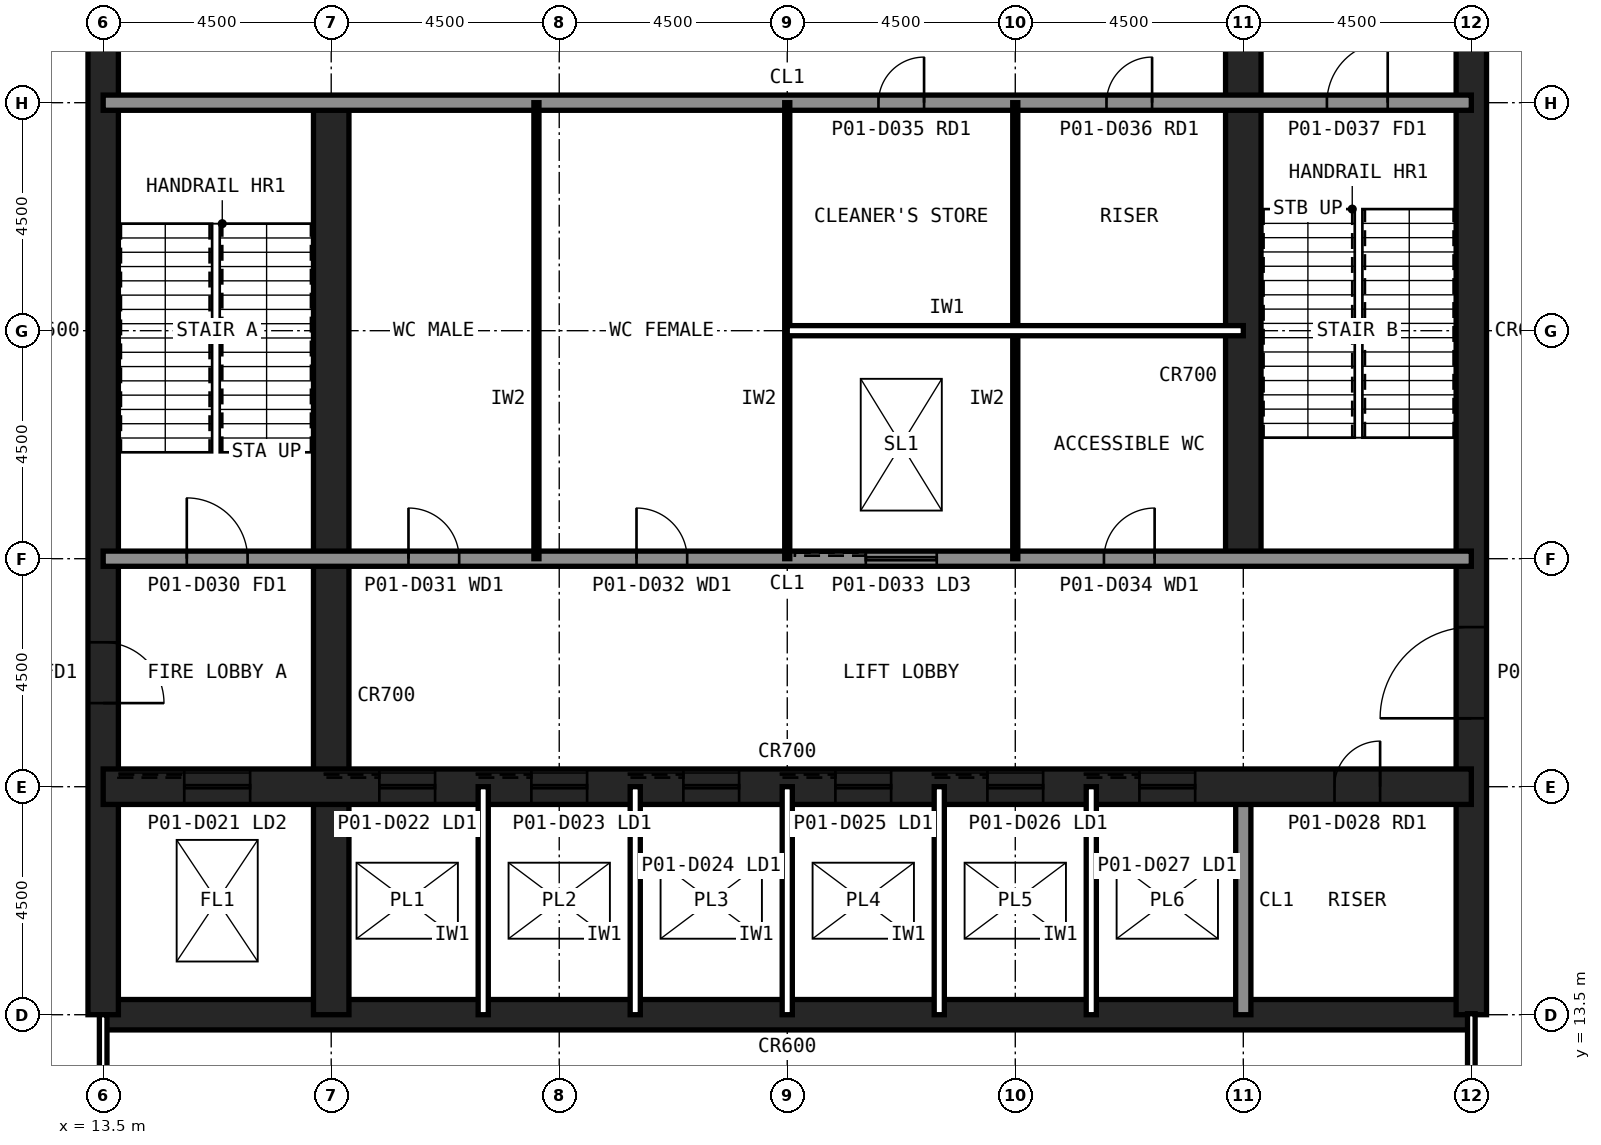
"""IFC4 building model, lengths in metres.
Left out: names, types, materials, properties, quantities, classifications, styles, units other than length and angle.
Written with IfcOpenShell. Run it as: python <this file> out.ifc"""

import sys

from ifc_helpers import new_model, si_unit, direction, frame, frame_2d, origin, place, context, subcontext, project, spatial, rectangle, extrude, element, fill, save


model = new_model("IFC4")
c1 = context("Model", 3, precision=1e-05, world=origin(), true_north=direction((0.0, 1.0)))
c2 = subcontext(c1, "Body", "Model", "MODEL_VIEW")
j1 = project(units=[si_unit("LENGTHUNIT", "METRE"), si_unit("PLANEANGLEUNIT", "RADIAN")], contexts=[c1])
p1 = place(None, origin())
s1 = spatial("IfcSite", under=j1, at=p1, CompositionType="ELEMENT")
p2 = place(p1, origin())
s2 = spatial("IfcBuilding", under=s1, at=p2, CompositionType="ELEMENT")
p3 = place(p2, origin())
s3 = spatial("IfcBuildingStorey", under=s2, at=p3, CompositionType="ELEMENT", Elevation=0.0)
p4 = place(p3, frame((13.5, 13.5, -0.25), z_axis=(0.0, 0.0, 1.0), x_axis=(1.0, 0.0, 0.0)))
e1 = element("IfcWall", 1, at=p4, inside=s3, PredefinedType="SHEAR", context=c2, shape_type="SweptSolid", body=[
    extrude(rectangle(XDim=27.0, YDim=0.6, at=frame_2d((13.5, 0.0))), origin(), (0.0, 0.0, 1.0), 6.25),
])
p5 = place(p3, frame((40.5, 13.5, -0.25), z_axis=(0.0, 0.0, 1.0), x_axis=(0.0, 1.0, 0.0)))
e2 = element("IfcWall", 2, at=p5, inside=s3, PredefinedType="SHEAR", context=c2, shape_type="SweptSolid", body=[
    extrude(rectangle(XDim=27.0, YDim=0.6, at=frame_2d((13.5, 0.0))), origin(), (0.0, 0.0, 1.0), 6.25),
])
p6 = place(p5, frame((5.85, 0.0, 0.25)))
e3 = element("IfcOpeningElement", 3, at=p6, cuts=e2, PredefinedType="OPENING", context=c2, shape_type="SweptSolid", body=[
    extrude(rectangle(XDim=1.8, YDim=2.1, at=frame_2d((0.9, 1.05))), frame((0.0, 0.31, 0.0), z_axis=(0.0, -1.0, 0.0), x_axis=(1.0, 0.0, 0.0)), (0.0, 0.0, 1.0), 0.62),
])
p7 = place(p5, frame((19.65, 0.0, 0.25)))
e4 = element("IfcOpeningElement", 4, at=p7, cuts=e2, PredefinedType="OPENING", context=c2, shape_type="SweptSolid", body=[
    extrude(rectangle(XDim=1.2, YDim=2.1, at=frame_2d((0.6, 1.05))), frame((0.0, 0.31, 0.0), z_axis=(0.0, -1.0, 0.0), x_axis=(1.0, 0.0, 0.0)), (0.0, 0.0, 1.0), 0.62),
])
p8 = place(p3, frame((13.5, 40.5, -0.25), z_axis=(0.0, 0.0, 1.0), x_axis=(0.0, -1.0, 0.0)))
e5 = element("IfcWall", 5, at=p8, inside=s3, PredefinedType="SHEAR", context=c2, shape_type="SweptSolid", body=[
    extrude(rectangle(XDim=27.0, YDim=0.6, at=frame_2d((13.5, 0.0))), origin(), (0.0, 0.0, 1.0), 6.25),
])
p9 = place(p8, frame((19.65, 0.0, 0.25)))
e6 = element("IfcOpeningElement", 6, at=p9, cuts=e5, PredefinedType="OPENING", context=c2, shape_type="SweptSolid", body=[
    extrude(rectangle(XDim=1.2, YDim=2.1, at=frame_2d((0.6, 1.05))), frame((0.0, 0.31, 0.0), z_axis=(0.0, -1.0, 0.0), x_axis=(1.0, 0.0, 0.0)), (0.0, 0.0, 1.0), 0.62),
])
p10 = place(p8, frame((5.85, 0.0, 0.25)))
e7 = element("IfcOpeningElement", 7, at=p10, cuts=e5, PredefinedType="OPENING", context=c2, shape_type="SweptSolid", body=[
    extrude(rectangle(XDim=1.8, YDim=2.1, at=frame_2d((0.9, 1.05))), frame((0.0, 0.31, 0.0), z_axis=(0.0, -1.0, 0.0), x_axis=(1.0, 0.0, 0.0)), (0.0, 0.0, 1.0), 0.62),
])
p11 = place(p3, frame((18.0, 13.5, -0.25), z_axis=(0.0, 0.0, 1.0), x_axis=(0.0, 1.0, 0.0)))
e8 = element("IfcWall", 8, at=p11, inside=s3, PredefinedType="SHEAR", context=c2, shape_type="SweptSolid", body=[
    extrude(rectangle(XDim=18.0, YDim=0.7, at=frame_2d((9.0, 0.0))), origin(), (0.0, 0.0, 1.0), 6.25),
])
p12 = place(p3, frame((36.0, 13.5, -0.25), z_axis=(0.0, 0.0, 1.0), x_axis=(0.0, 1.0, 0.0)))
e9 = element("IfcWall", 9, at=p12, inside=s3, PredefinedType="SOLIDWALL", context=c2, shape_type="SweptSolid", body=[
    extrude(rectangle(XDim=4.5, YDim=0.3, at=frame_2d((2.25, 0.0))), origin(), (0.0, 0.0, 1.0), 6.05),
])
p13 = place(p3, frame((36.0, 22.5, -0.25), z_axis=(0.0, 0.0, 1.0), x_axis=(0.0, 1.0, 0.0)))
e10 = element("IfcWall", 10, at=p13, inside=s3, PredefinedType="SHEAR", context=c2, shape_type="SweptSolid", body=[
    extrude(rectangle(XDim=18.0, YDim=0.7, at=frame_2d((9.0, 0.0))), origin(), (0.0, 0.0, 1.0), 6.25),
])
p14 = place(p3, frame((13.5, 18.0, -0.25), z_axis=(0.0, 0.0, 1.0), x_axis=(1.0, 0.0, 0.0)))
e11 = element("IfcWall", 11, at=p14, inside=s3, PredefinedType="SHEAR", context=c2, shape_type="SweptSolid", body=[
    extrude(rectangle(XDim=27.0, YDim=0.7, at=frame_2d((13.5, 0.0))), origin(), (0.0, 0.0, 1.0), 6.25),
])
p15 = place(p14, frame((24.3, 0.0, 0.25)))
e12 = element("IfcOpeningElement", 12, at=p15, cuts=e11, PredefinedType="OPENING", context=c2, shape_type="SweptSolid", body=[
    extrude(rectangle(XDim=0.9, YDim=2.1, at=frame_2d((0.45, 1.05))), frame((0.0, 0.36, 0.0), z_axis=(0.0, -1.0, 0.0), x_axis=(1.0, 0.0, 0.0)), (0.0, 0.0, 1.0), 0.72),
])
p16 = place(p14, frame((5.45, 0.0, 0.25)))
e13 = element("IfcOpeningElement", 13, at=p16, cuts=e11, PredefinedType="OPENING", context=c2, shape_type="SweptSolid", body=[
    extrude(rectangle(XDim=1.1, YDim=2.1, at=frame_2d((0.55, 1.05))), frame((0.0, 0.36, 0.0), z_axis=(0.0, -1.0, 0.0), x_axis=(1.0, 0.0, 0.0)), (0.0, 0.0, 1.0), 0.72),
])
p17 = place(p14, frame((8.45, 0.0, 0.25)))
e14 = element("IfcOpeningElement", 14, at=p17, cuts=e11, PredefinedType="OPENING", context=c2, shape_type="SweptSolid", body=[
    extrude(rectangle(XDim=1.1, YDim=2.1, at=frame_2d((0.55, 1.05))), frame((0.0, 0.36, 0.0), z_axis=(0.0, -1.0, 0.0), x_axis=(1.0, 0.0, 0.0)), (0.0, 0.0, 1.0), 0.72),
])
p18 = place(p14, frame((11.45, 0.0, 0.25)))
e15 = element("IfcOpeningElement", 15, at=p18, cuts=e11, PredefinedType="OPENING", context=c2, shape_type="SweptSolid", body=[
    extrude(rectangle(XDim=1.1, YDim=2.1, at=frame_2d((0.55, 1.05))), frame((0.0, 0.36, 0.0), z_axis=(0.0, -1.0, 0.0), x_axis=(1.0, 0.0, 0.0)), (0.0, 0.0, 1.0), 0.72),
])
p19 = place(p14, frame((14.45, 0.0, 0.25)))
e16 = element("IfcOpeningElement", 16, at=p19, cuts=e11, PredefinedType="OPENING", context=c2, shape_type="SweptSolid", body=[
    extrude(rectangle(XDim=1.1, YDim=2.1, at=frame_2d((0.55, 1.05))), frame((0.0, 0.36, 0.0), z_axis=(0.0, -1.0, 0.0), x_axis=(1.0, 0.0, 0.0)), (0.0, 0.0, 1.0), 0.72),
])
p20 = place(p14, frame((17.45, 0.0, 0.25)))
e17 = element("IfcOpeningElement", 17, at=p20, cuts=e11, PredefinedType="OPENING", context=c2, shape_type="SweptSolid", body=[
    extrude(rectangle(XDim=1.1, YDim=2.1, at=frame_2d((0.55, 1.05))), frame((0.0, 0.36, 0.0), z_axis=(0.0, -1.0, 0.0), x_axis=(1.0, 0.0, 0.0)), (0.0, 0.0, 1.0), 0.72),
])
p21 = place(p14, frame((20.45, 0.0, 0.25)))
e18 = element("IfcOpeningElement", 18, at=p21, cuts=e11, PredefinedType="OPENING", context=c2, shape_type="SweptSolid", body=[
    extrude(rectangle(XDim=1.1, YDim=2.1, at=frame_2d((0.55, 1.05))), frame((0.0, 0.36, 0.0), z_axis=(0.0, -1.0, 0.0), x_axis=(1.0, 0.0, 0.0)), (0.0, 0.0, 1.0), 0.72),
])
p22 = place(p14, frame((1.6, 0.0, 0.25)))
e19 = element("IfcOpeningElement", 19, at=p22, cuts=e11, PredefinedType="OPENING", context=c2, shape_type="SweptSolid", body=[
    extrude(rectangle(XDim=1.3, YDim=2.2, at=frame_2d((0.65, 1.1))), frame((0.0, 0.36, 0.0), z_axis=(0.0, -1.0, 0.0), x_axis=(1.0, 0.0, 0.0)), (0.0, 0.0, 1.0), 0.72),
])
p23 = place(p3, frame((13.5, 22.5, -0.25), z_axis=(0.0, 0.0, 1.0), x_axis=(1.0, 0.0, 0.0)))
e20 = element("IfcWall", 20, at=p23, inside=s3, PredefinedType="SOLIDWALL", context=c2, shape_type="SweptSolid", body=[
    extrude(rectangle(XDim=27.0, YDim=0.3, at=frame_2d((13.5, 0.0))), origin(), (0.0, 0.0, 1.0), 6.05),
])
p24 = place(p23, frame((1.65, 0.0, 0.25)))
e21 = element("IfcOpeningElement", 21, at=p24, cuts=e20, PredefinedType="OPENING", context=c2, shape_type="SweptSolid", body=[
    extrude(rectangle(XDim=1.2, YDim=2.1, at=frame_2d((0.6, 1.05))), frame((0.0, 0.16, 0.0), z_axis=(0.0, -1.0, 0.0), x_axis=(1.0, 0.0, 0.0)), (0.0, 0.0, 1.0), 0.32),
])
p25 = place(p23, frame((6.025, 0.0, 0.25)))
e22 = element("IfcOpeningElement", 22, at=p25, cuts=e20, PredefinedType="OPENING", context=c2, shape_type="SweptSolid", body=[
    extrude(rectangle(XDim=1.0, YDim=2.1, at=frame_2d((0.5, 1.05))), frame((0.0, 0.16, 0.0), z_axis=(0.0, -1.0, 0.0), x_axis=(1.0, 0.0, 0.0)), (0.0, 0.0, 1.0), 0.32),
])
p26 = place(p23, frame((10.525, 0.0, 0.25)))
e23 = element("IfcOpeningElement", 23, at=p26, cuts=e20, PredefinedType="OPENING", context=c2, shape_type="SweptSolid", body=[
    extrude(rectangle(XDim=1.0, YDim=2.1, at=frame_2d((0.5, 1.05))), frame((0.0, 0.16, 0.0), z_axis=(0.0, -1.0, 0.0), x_axis=(1.0, 0.0, 0.0)), (0.0, 0.0, 1.0), 0.32),
])
p27 = place(p23, frame((19.75, 0.0, 0.25)))
e24 = element("IfcOpeningElement", 24, at=p27, cuts=e20, PredefinedType="OPENING", context=c2, shape_type="SweptSolid", body=[
    extrude(rectangle(XDim=1.0, YDim=2.1, at=frame_2d((0.5, 1.05))), frame((0.0, 0.16, 0.0), z_axis=(0.0, -1.0, 0.0), x_axis=(1.0, 0.0, 0.0)), (0.0, 0.0, 1.0), 0.32),
])
p28 = place(p23, frame((15.05, 0.0, 0.25)))
e25 = element("IfcOpeningElement", 25, at=p28, cuts=e20, PredefinedType="OPENING", context=c2, shape_type="SweptSolid", body=[
    extrude(rectangle(XDim=1.4, YDim=2.4, at=frame_2d((0.7, 1.2))), frame((0.0, 0.16, 0.0), z_axis=(0.0, -1.0, 0.0), x_axis=(1.0, 0.0, 0.0)), (0.0, 0.0, 1.0), 0.32),
])
p29 = place(p3, frame((13.5, 31.5, -0.25), z_axis=(0.0, 0.0, 1.0), x_axis=(1.0, 0.0, 0.0)))
e26 = element("IfcWall", 26, at=p29, inside=s3, PredefinedType="SOLIDWALL", context=c2, shape_type="SweptSolid", body=[
    extrude(rectangle(XDim=27.0, YDim=0.3, at=frame_2d((13.5, 0.0))), origin(), (0.0, 0.0, 1.0), 6.05),
])
p30 = place(p29, frame((24.15, 0.0, 0.25)))
e27 = element("IfcOpeningElement", 27, at=p30, cuts=e26, PredefinedType="OPENING", context=c2, shape_type="SweptSolid", body=[
    extrude(rectangle(XDim=1.2, YDim=2.1, at=frame_2d((0.6, 1.05))), frame((0.0, 0.16, 0.0), z_axis=(0.0, -1.0, 0.0), x_axis=(1.0, 0.0, 0.0)), (0.0, 0.0, 1.0), 0.32),
])
p31 = place(p29, frame((15.3, 0.0, 0.25)))
e28 = element("IfcOpeningElement", 28, at=p31, cuts=e26, PredefinedType="OPENING", context=c2, shape_type="SweptSolid", body=[
    extrude(rectangle(XDim=0.9, YDim=2.1, at=frame_2d((0.45, 1.05))), frame((0.0, 0.16, 0.0), z_axis=(0.0, -1.0, 0.0), x_axis=(1.0, 0.0, 0.0)), (0.0, 0.0, 1.0), 0.32),
])
p32 = place(p29, frame((19.8, 0.0, 0.25)))
e29 = element("IfcOpeningElement", 29, at=p32, cuts=e26, PredefinedType="OPENING", context=c2, shape_type="SweptSolid", body=[
    extrude(rectangle(XDim=0.9, YDim=2.1, at=frame_2d((0.45, 1.05))), frame((0.0, 0.16, 0.0), z_axis=(0.0, -1.0, 0.0), x_axis=(1.0, 0.0, 0.0)), (0.0, 0.0, 1.0), 0.32),
])
for number, where, z_axis, x_axis in (
    (30, (21.0, 13.5, -0.25), (0.0, 0.0, 1.0), (0.0, 1.0, 0.0)),
    (31, (24.0, 13.5, -0.25), (0.0, 0.0, 1.0), (0.0, 1.0, 0.0)),
    (32, (27.0, 13.5, -0.25), (0.0, 0.0, 1.0), (0.0, 1.0, 0.0)),
    (33, (30.0, 13.5, -0.25), (0.0, 0.0, 1.0), (0.0, 1.0, 0.0)),
    (34, (33.0, 13.5, -0.25), (0.0, 0.0, 1.0), (0.0, 1.0, 0.0)),
):
    element("IfcWall", number, at=place(p3, frame(where, z_axis=z_axis, x_axis=x_axis)), inside=s3, PredefinedType="PARTITIONING", context=c2, shape_type="SweptSolid", body=[
        extrude(rectangle(XDim=4.5, YDim=0.2, at=frame_2d((2.25, 0.0))), origin(), (0.0, 0.0, 1.0), 6.05),
    ])
for number, where, z_axis, x_axis in (
    (35, (22.05, 22.5, -0.25), (0.0, 0.0, 1.0), (0.0, 1.0, 0.0)),
    (36, (27.0, 22.5, -0.25), (0.0, 0.0, 1.0), (0.0, 1.0, 0.0)),
    (37, (31.5, 22.5, -0.25), (0.0, 0.0, 1.0), (0.0, 1.0, 0.0)),
):
    element("IfcWall", number, at=place(p3, frame(where, z_axis=z_axis, x_axis=x_axis)), inside=s3, PredefinedType="PLUMBINGWALL", context=c2, shape_type="SweptSolid", body=[
        extrude(rectangle(XDim=9.0, YDim=0.1, at=frame_2d((4.5, 0.0))), origin(), (0.0, 0.0, 1.0), 6.05),
    ])
p33 = place(p3, frame((27.0, 27.0, -0.25), z_axis=(0.0, 0.0, 1.0), x_axis=(1.0, 0.0, 0.0)))
e38 = element("IfcWall", 38, at=p33, inside=s3, PredefinedType="PARTITIONING", context=c2, shape_type="SweptSolid", body=[
    extrude(rectangle(XDim=9.0, YDim=0.2, at=frame_2d((4.5, 0.0))), origin(), (0.0, 0.0, 1.0), 6.05),
])
p34 = place(p3, frame((40.5, 0.47, 0.0), z_axis=(0.0, 0.0, 1.0), x_axis=(0.0, 1.0, 0.0)))
e39 = element("IfcWall", 39, at=p34, inside=s3, PredefinedType="PARTITIONING", context=c2, shape_type="SweptSolid", body=[
    extrude(rectangle(XDim=13.05, YDim=0.15, at=frame_2d((6.525, 0.0))), origin(), (0.0, 0.0, 1.0), 4.881),
])
p35 = place(p34, frame((6.025, 0.0, 0.0)))
e40 = element("IfcOpeningElement", 40, at=p35, cuts=e39, PredefinedType="OPENING", context=c2, shape_type="SweptSolid", body=[
    extrude(rectangle(XDim=1.0, YDim=2.1, at=frame_2d((0.5, 1.05))), frame((0.0, 0.085, 0.0), z_axis=(0.0, -1.0, 0.0), x_axis=(1.0, 0.0, 0.0)), (0.0, 0.0, 1.0), 0.17),
])
p36 = place(p3, frame((13.5, 0.47, 0.0), z_axis=(0.0, 0.0, 1.0), x_axis=(0.0, 1.0, 0.0)))
e41 = element("IfcWall", 41, at=p36, inside=s3, PredefinedType="PARTITIONING", context=c2, shape_type="SweptSolid", body=[
    extrude(rectangle(XDim=13.03, YDim=0.15, at=frame_2d((6.515, 0.0))), origin(), (0.0, 0.0, 1.0), 4.881),
])
p37 = place(p36, frame((6.015, 0.0, 0.0)))
e42 = element("IfcOpeningElement", 42, at=p37, cuts=e41, PredefinedType="OPENING", context=c2, shape_type="SweptSolid", body=[
    extrude(rectangle(XDim=1.0, YDim=2.1, at=frame_2d((0.5, 1.05))), frame((0.0, 0.085, 0.0), z_axis=(0.0, -1.0, 0.0), x_axis=(1.0, 0.0, 0.0)), (0.0, 0.0, 1.0), 0.17),
])
p38 = place(p9, origin())
e43 = element("IfcDoor", 43, at=p38, inside=s3, OperationType="SINGLE_SWING_RIGHT", PredefinedType="DOOR", context=c2, shape_type="SweptSolid", body=[
    extrude(rectangle(XDim=1.2, YDim=2.1, at=frame_2d((0.6, 1.05))), frame((0.0, 0.025, 0.0), z_axis=(0.0, -1.0, 0.0), x_axis=(1.0, 0.0, 0.0)), (0.0, 0.0, 1.0), 0.05),
])
fill(e6, e43)
p39 = place(p6, origin())
e44 = element("IfcDoor", 44, at=p39, inside=s3, OperationType="SINGLE_SWING_LEFT", PredefinedType="DOOR", context=c2, shape_type="SweptSolid", body=[
    extrude(rectangle(XDim=1.8, YDim=2.1, at=frame_2d((0.9, 1.05))), frame((0.0, 0.025, 0.0), z_axis=(0.0, -1.0, 0.0), x_axis=(1.0, 0.0, 0.0)), (0.0, 0.0, 1.0), 0.05),
])
fill(e3, e44)
p40 = place(p24, origin())
e45 = element("IfcDoor", 45, at=p40, inside=s3, OperationType="SINGLE_SWING_LEFT", PredefinedType="DOOR", context=c2, shape_type="SweptSolid", body=[
    extrude(rectangle(XDim=1.2, YDim=2.1, at=frame_2d((0.6, 1.05))), frame((0.0, 0.025, 0.0), z_axis=(0.0, -1.0, 0.0), x_axis=(1.0, 0.0, 0.0)), (0.0, 0.0, 1.0), 0.05),
])
fill(e21, e45)
p41 = place(p30, origin())
e46 = element("IfcDoor", 46, at=p41, inside=s3, OperationType="SINGLE_SWING_RIGHT", PredefinedType="DOOR", context=c2, shape_type="SweptSolid", body=[
    extrude(rectangle(XDim=1.2, YDim=2.1, at=frame_2d((0.6, 1.05))), frame((0.0, 0.025, 0.0), z_axis=(0.0, -1.0, 0.0), x_axis=(1.0, 0.0, 0.0)), (0.0, 0.0, 1.0), 0.05),
])
fill(e27, e46)
p42 = place(p25, origin())
e47 = element("IfcDoor", 47, at=p42, inside=s3, OperationType="SINGLE_SWING_LEFT", PredefinedType="DOOR", context=c2, shape_type="SweptSolid", body=[
    extrude(rectangle(XDim=1.0, YDim=2.1, at=frame_2d((0.5, 1.05))), frame((0.0, 0.025, 0.0), z_axis=(0.0, -1.0, 0.0), x_axis=(1.0, 0.0, 0.0)), (0.0, 0.0, 1.0), 0.05),
])
fill(e22, e47)
p43 = place(p26, origin())
e48 = element("IfcDoor", 48, at=p43, inside=s3, OperationType="SINGLE_SWING_LEFT", PredefinedType="DOOR", context=c2, shape_type="SweptSolid", body=[
    extrude(rectangle(XDim=1.0, YDim=2.1, at=frame_2d((0.5, 1.05))), frame((0.0, 0.025, 0.0), z_axis=(0.0, -1.0, 0.0), x_axis=(1.0, 0.0, 0.0)), (0.0, 0.0, 1.0), 0.05),
])
fill(e23, e48)
p44 = place(p27, origin())
e49 = element("IfcDoor", 49, at=p44, inside=s3, OperationType="SINGLE_SWING_RIGHT", PredefinedType="DOOR", context=c2, shape_type="SweptSolid", body=[
    extrude(rectangle(XDim=1.0, YDim=2.1, at=frame_2d((0.5, 1.05))), frame((0.0, 0.025, 0.0), z_axis=(0.0, -1.0, 0.0), x_axis=(1.0, 0.0, 0.0)), (0.0, 0.0, 1.0), 0.05),
])
fill(e24, e49)
p45 = place(p31, origin())
e50 = element("IfcDoor", 50, at=p45, inside=s3, OperationType="SINGLE_SWING_RIGHT", PredefinedType="DOOR", context=c2, shape_type="SweptSolid", body=[
    extrude(rectangle(XDim=0.9, YDim=2.1, at=frame_2d((0.45, 1.05))), frame((0.0, 0.025, 0.0), z_axis=(0.0, -1.0, 0.0), x_axis=(1.0, 0.0, 0.0)), (0.0, 0.0, 1.0), 0.05),
])
fill(e28, e50)
p46 = place(p32, origin())
e51 = element("IfcDoor", 51, at=p46, inside=s3, OperationType="SINGLE_SWING_RIGHT", PredefinedType="DOOR", context=c2, shape_type="SweptSolid", body=[
    extrude(rectangle(XDim=0.9, YDim=2.1, at=frame_2d((0.45, 1.05))), frame((0.0, 0.025, 0.0), z_axis=(0.0, -1.0, 0.0), x_axis=(1.0, 0.0, 0.0)), (0.0, 0.0, 1.0), 0.05),
])
fill(e29, e51)
p47 = place(p15, origin())
e52 = element("IfcDoor", 52, at=p47, inside=s3, OperationType="SINGLE_SWING_RIGHT", PredefinedType="DOOR", context=c2, shape_type="SweptSolid", body=[
    extrude(rectangle(XDim=0.9, YDim=2.1, at=frame_2d((0.45, 1.05))), frame((0.0, 0.025, 0.0), z_axis=(0.0, -1.0, 0.0), x_axis=(1.0, 0.0, 0.0)), (0.0, 0.0, 1.0), 0.05),
])
fill(e12, e52)
p48 = place(p16, origin())
e53 = element("IfcDoor", 53, at=p48, inside=s3, OperationType="SLIDING_TO_LEFT", PredefinedType="DOOR", context=c2, shape_type="SweptSolid", body=[
    extrude(rectangle(XDim=1.1, YDim=2.1, at=frame_2d((0.55, 1.05))), frame((0.0, 0.025, 0.0), z_axis=(0.0, -1.0, 0.0), x_axis=(1.0, 0.0, 0.0)), (0.0, 0.0, 1.0), 0.05),
])
fill(e13, e53)
p49 = place(p17, origin())
e54 = element("IfcDoor", 54, at=p49, inside=s3, OperationType="SLIDING_TO_LEFT", PredefinedType="DOOR", context=c2, shape_type="SweptSolid", body=[
    extrude(rectangle(XDim=1.1, YDim=2.1, at=frame_2d((0.55, 1.05))), frame((0.0, 0.025, 0.0), z_axis=(0.0, -1.0, 0.0), x_axis=(1.0, 0.0, 0.0)), (0.0, 0.0, 1.0), 0.05),
])
fill(e14, e54)
p50 = place(p18, origin())
e55 = element("IfcDoor", 55, at=p50, inside=s3, OperationType="SLIDING_TO_LEFT", PredefinedType="DOOR", context=c2, shape_type="SweptSolid", body=[
    extrude(rectangle(XDim=1.1, YDim=2.1, at=frame_2d((0.55, 1.05))), frame((0.0, 0.025, 0.0), z_axis=(0.0, -1.0, 0.0), x_axis=(1.0, 0.0, 0.0)), (0.0, 0.0, 1.0), 0.05),
])
fill(e15, e55)
p51 = place(p19, origin())
e56 = element("IfcDoor", 56, at=p51, inside=s3, OperationType="SLIDING_TO_LEFT", PredefinedType="DOOR", context=c2, shape_type="SweptSolid", body=[
    extrude(rectangle(XDim=1.1, YDim=2.1, at=frame_2d((0.55, 1.05))), frame((0.0, 0.025, 0.0), z_axis=(0.0, -1.0, 0.0), x_axis=(1.0, 0.0, 0.0)), (0.0, 0.0, 1.0), 0.05),
])
fill(e16, e56)
p52 = place(p20, origin())
e57 = element("IfcDoor", 57, at=p52, inside=s3, OperationType="SLIDING_TO_LEFT", PredefinedType="DOOR", context=c2, shape_type="SweptSolid", body=[
    extrude(rectangle(XDim=1.1, YDim=2.1, at=frame_2d((0.55, 1.05))), frame((0.0, 0.025, 0.0), z_axis=(0.0, -1.0, 0.0), x_axis=(1.0, 0.0, 0.0)), (0.0, 0.0, 1.0), 0.05),
])
fill(e17, e57)
p53 = place(p21, origin())
e58 = element("IfcDoor", 58, at=p53, inside=s3, OperationType="SLIDING_TO_LEFT", PredefinedType="DOOR", context=c2, shape_type="SweptSolid", body=[
    extrude(rectangle(XDim=1.1, YDim=2.1, at=frame_2d((0.55, 1.05))), frame((0.0, 0.025, 0.0), z_axis=(0.0, -1.0, 0.0), x_axis=(1.0, 0.0, 0.0)), (0.0, 0.0, 1.0), 0.05),
])
fill(e18, e58)
p54 = place(p22, origin())
e59 = element("IfcDoor", 59, at=p54, inside=s3, OperationType="SLIDING_TO_LEFT", PredefinedType="DOOR", context=c2, shape_type="SweptSolid", body=[
    extrude(rectangle(XDim=1.3, YDim=2.2, at=frame_2d((0.65, 1.1))), frame((0.0, 0.025, 0.0), z_axis=(0.0, -1.0, 0.0), x_axis=(1.0, 0.0, 0.0)), (0.0, 0.0, 1.0), 0.05),
])
fill(e19, e59)
p55 = place(p28, origin())
e60 = element("IfcDoor", 60, at=p55, inside=s3, OperationType="SLIDING_TO_LEFT", PredefinedType="DOOR", context=c2, shape_type="SweptSolid", body=[
    extrude(rectangle(XDim=1.4, YDim=2.4, at=frame_2d((0.7, 1.2))), frame((0.0, 0.025, 0.0), z_axis=(0.0, -1.0, 0.0), x_axis=(1.0, 0.0, 0.0)), (0.0, 0.0, 1.0), 0.05),
])
fill(e25, e60)
save(model, sys.argv[1])
